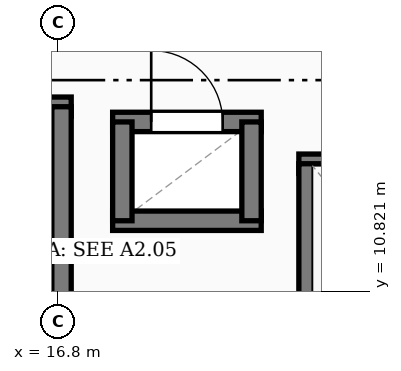
"""IFC4 building model, lengths in metres.
Left out: names, types, materials, properties, quantities, classifications, styles, units other than length and angle.
Written with IfcOpenShell. Run it as: python <this file> out.ifc"""

import sys

from ifc_helpers import new_model, si_unit, direction, frame, frame_2d, origin, place, context, subcontext, project, spatial, rectangle, extrude, element, fill, save


model = new_model("IFC4")
c1 = context("Model", 3, precision=1e-05, world=origin(), true_north=direction((0.0, 1.0)))
c2 = subcontext(c1, "Body", "Model", "MODEL_VIEW")
j1 = project(units=[si_unit("LENGTHUNIT", "METRE"), si_unit("PLANEANGLEUNIT", "RADIAN")], contexts=[c1])
p1 = place(None, origin())
s1 = spatial("IfcSite", under=j1, at=p1, CompositionType="ELEMENT")
p2 = place(p1, origin())
s2 = spatial("IfcBuilding", under=s1, at=p2, CompositionType="ELEMENT")
p3 = place(p2, frame((0.0, 0.0, 3.92)))
s3 = spatial("IfcBuildingStorey", under=s2, at=p3, CompositionType="ELEMENT", Elevation=3.92)
p4 = place(p3, frame((8.752, 13.25, 0.0), z_axis=(0.0, 0.0, 1.0), x_axis=(1.0, 0.0, 0.0)))
e1 = element("IfcWall", 1, at=p4, inside=s3, PredefinedType="SOLIDWALL", context=c2, shape_type="SweptSolid", body=[
    extrude(rectangle(XDim=8.225, YDim=0.255, at=frame_2d((4.113, 0.0))), origin(), (0.0, 0.0, 1.0), 3.36),
])
p5 = place(p4, frame((0.35, 0.0, 0.0)))
e2 = element("IfcOpeningElement", 2, at=p5, cuts=e1, PredefinedType="OPENING", context=c2, shape_type="SweptSolid", body=[
    extrude(rectangle(XDim=1.25, YDim=2.2, at=frame_2d((0.625, 1.1))), frame((0.0, 0.137, 0.0), z_axis=(0.0, -1.0, 0.0), x_axis=(1.0, 0.0, 0.0)), (0.0, 0.0, 1.0), 0.275),
])
p6 = place(p3, frame((16.85, 9.38, 0.0), z_axis=(0.0, 0.0, 1.0), x_axis=(0.0, 1.0, 0.0)))
e3 = element("IfcWall", 3, at=p6, inside=s3, PredefinedType="SOLIDWALL", context=c2, shape_type="SweptSolid", body=[
    extrude(rectangle(XDim=3.87, YDim=0.255, at=frame_2d((1.935, 0.0))), origin(), (0.0, 0.0, 1.0), 3.36),
])
p7 = place(p3, frame((19.972, 12.5, 0.0), z_axis=(0.0, 0.0, 1.0), x_axis=(1.0, 0.0, 0.0)))
e4 = element("IfcWall", 4, at=p7, inside=s3, PredefinedType="SOLIDWALL", context=c2, shape_type="SweptSolid", body=[
    extrude(rectangle(XDim=2.455, YDim=0.255, at=frame_2d((1.228, 0.0))), origin(), (0.0, 0.0, 1.0), 3.36),
])
p8 = place(p7, frame((0.677, 0.0, 0.0)))
e5 = element("IfcOpeningElement", 5, at=p8, cuts=e4, PredefinedType="OPENING", context=c2, shape_type="SweptSolid", body=[
    extrude(rectangle(XDim=1.1, YDim=2.15, at=frame_2d((0.55, 1.075))), frame((0.0, 0.137, 0.0), z_axis=(0.0, -1.0, 0.0), x_axis=(1.0, 0.0, 0.0)), (0.0, 0.0, 1.0), 0.275),
])
p9 = place(p3, frame((20.1, 9.9, 0.0), z_axis=(0.0, 0.0, 1.0), x_axis=(0.0, 1.0, 0.0)))
e6 = element("IfcWall", 6, at=p9, inside=s3, PredefinedType="SOLIDWALL", context=c2, shape_type="SweptSolid", body=[
    extrude(rectangle(XDim=2.6, YDim=0.255, at=frame_2d((1.3, 0.0))), origin(), (0.0, 0.0, 1.0), 3.36),
])
p10 = place(p3, frame((17.522, 11.75, 0.0), z_axis=(0.0, 0.0, 1.0), x_axis=(1.0, 0.0, 0.0)))
e7 = element("IfcWall", 7, at=p10, inside=s3, PredefinedType="SOLIDWALL", context=c2, shape_type="SweptSolid", body=[
    extrude(rectangle(XDim=1.955, YDim=0.255, at=frame_2d((0.978, 0.0))), origin(), (0.0, 0.0, 1.0), 3.36),
])
p11 = place(p3, frame((17.522, 13.05, 0.0), z_axis=(0.0, 0.0, 1.0), x_axis=(1.0, 0.0, 0.0)))
e8 = element("IfcWall", 8, at=p11, inside=s3, PredefinedType="SOLIDWALL", context=c2, shape_type="SweptSolid", body=[
    extrude(rectangle(XDim=1.955, YDim=0.255, at=frame_2d((0.978, 0.0))), origin(), (0.0, 0.0, 1.0), 3.36),
])
p12 = place(p11, frame((0.508, 0.0, 0.0)))
e9 = element("IfcOpeningElement", 9, at=p12, cuts=e8, PredefinedType="OPENING", context=c2, shape_type="SweptSolid", body=[
    extrude(rectangle(XDim=0.94, YDim=2.1, at=frame_2d((0.47, 1.05))), frame((0.0, 0.137, 0.0), z_axis=(0.0, -1.0, 0.0), x_axis=(1.0, 0.0, 0.0)), (0.0, 0.0, 1.0), 0.275),
])
for number, where, z_axis, x_axis in (
    (10, (17.65, 11.75, 0.0), (0.0, 0.0, 1.0), (0.0, 1.0, 0.0)),
    (11, (19.35, 11.75, 0.0), (0.0, 0.0, 1.0), (0.0, 1.0, 0.0)),
):
    element("IfcWall", number, at=place(p3, frame(where, z_axis=z_axis, x_axis=x_axis)), inside=s3, PredefinedType="SOLIDWALL", context=c2, shape_type="SweptSolid", body=[
        extrude(rectangle(XDim=1.3, YDim=0.255, at=frame_2d((0.65, 0.0))), origin(), (0.0, 0.0, 1.0), 3.36),
    ])
p13 = place(p12, origin())
e12 = element("IfcDoor", 12, at=p13, inside=s3, OperationType="SINGLE_SWING_LEFT", PredefinedType="DOOR", context=c2, shape_type="SweptSolid", body=[
    extrude(rectangle(XDim=0.94, YDim=2.1, at=frame_2d((0.47, 1.05))), frame((0.0, 0.025, 0.0), z_axis=(0.0, -1.0, 0.0), x_axis=(1.0, 0.0, 0.0)), (0.0, 0.0, 1.0), 0.05),
])
fill(e9, e12)
save(model, sys.argv[1])
